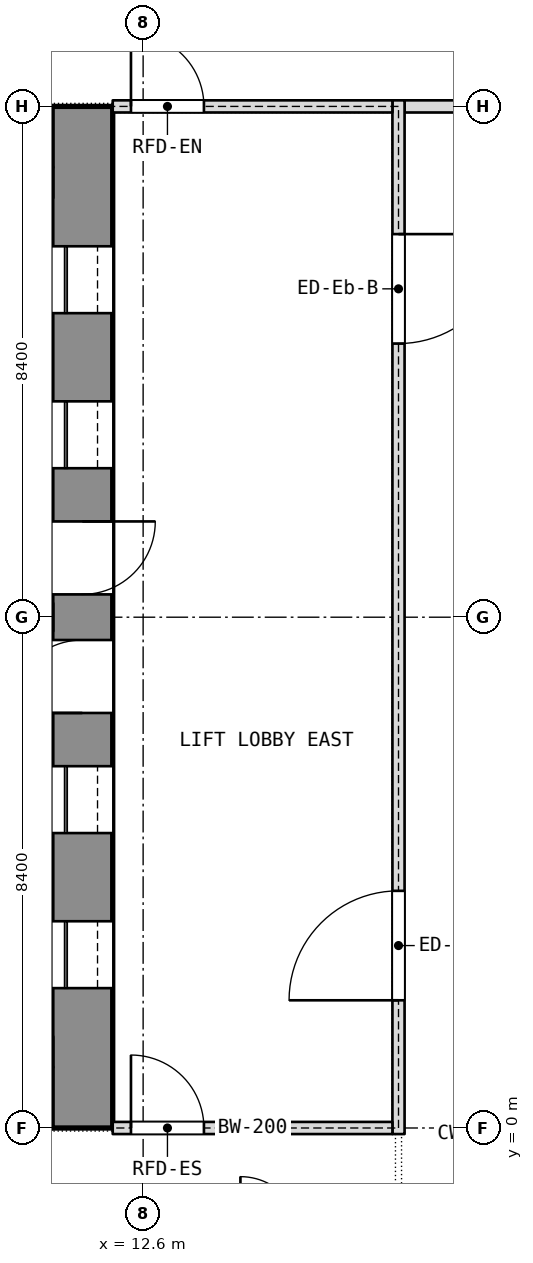
"""IFC4 building model, lengths in metres.
Left out: names, types, materials, properties, quantities, classifications, styles, units other than length and angle.
Written with IfcOpenShell. Run it as: python <this file> out.ifc"""

import sys

from ifc_helpers import new_model, si_unit, direction, frame, frame_2d, origin, place, context, subcontext, project, spatial, rectangle, extrude, element, fill, save


model = new_model("IFC4")
c1 = context("Model", 3, precision=1e-05, world=origin(), true_north=direction((0.0, 1.0)))
c2 = subcontext(c1, "Body", "Model", "MODEL_VIEW")
j1 = project(units=[si_unit("LENGTHUNIT", "METRE"), si_unit("PLANEANGLEUNIT", "RADIAN")], contexts=[c1])
p1 = place(None, origin())
s1 = spatial("IfcSite", under=j1, at=p1, CompositionType="ELEMENT")
p2 = place(p1, origin())
s2 = spatial("IfcBuilding", under=s1, at=p2, CompositionType="ELEMENT")
p3 = place(p2, frame((0.0, 0.0, 133.7)))
s3 = spatial("IfcBuildingStorey", under=s2, at=p3, CompositionType="ELEMENT", Elevation=133.7)
p4 = place(p3, frame((11.6, 0.0, 0.0), z_axis=(0.0, 0.0, 1.0), x_axis=(0.0, 1.0, 0.0)))
e1 = element("IfcWall", 1, at=p4, inside=s3, PredefinedType="SHEAR", context=c2, shape_type="SweptSolid", body=[
    extrude(rectangle(XDim=16.8, YDim=1.0, at=frame_2d((8.4, 0.0))), origin(), (0.0, 0.0, 1.0), 3.6),
])
p5 = place(p4, frame((2.3, 0.0, 0.0)))
e2 = element("IfcOpeningElement", 2, at=p5, cuts=e1, PredefinedType="OPENING", context=c2, shape_type="SweptSolid", body=[
    extrude(rectangle(XDim=1.1, YDim=2.1, at=frame_2d((0.55, 1.05))), frame((0.0, 0.5, 0.0), z_axis=(0.0, -1.0, 0.0), x_axis=(1.0, 0.0, 0.0)), (0.0, 0.0, 1.0), 1.0),
])
p6 = place(p4, frame((4.85, 0.0, 0.0)))
e3 = element("IfcOpeningElement", 3, at=p6, cuts=e1, PredefinedType="OPENING", context=c2, shape_type="SweptSolid", body=[
    extrude(rectangle(XDim=1.1, YDim=2.1, at=frame_2d((0.55, 1.05))), frame((0.0, 0.5, 0.0), z_axis=(0.0, -1.0, 0.0), x_axis=(1.0, 0.0, 0.0)), (0.0, 0.0, 1.0), 1.0),
])
p7 = place(p4, frame((6.825, 0.0, 0.0)))
e4 = element("IfcOpeningElement", 4, at=p7, cuts=e1, PredefinedType="OPENING", context=c2, shape_type="SweptSolid", body=[
    extrude(rectangle(XDim=1.2, YDim=2.1, at=frame_2d((0.6, 1.05))), frame((0.0, 0.5, 0.0), z_axis=(0.0, -1.0, 0.0), x_axis=(1.0, 0.0, 0.0)), (0.0, 0.0, 1.0), 1.0),
])
p8 = place(p4, frame((13.4, 0.0, 0.0)))
e5 = element("IfcOpeningElement", 5, at=p8, cuts=e1, PredefinedType="OPENING", context=c2, shape_type="SweptSolid", body=[
    extrude(rectangle(XDim=1.1, YDim=2.1, at=frame_2d((0.55, 1.05))), frame((0.0, 0.5, 0.0), z_axis=(0.0, -1.0, 0.0), x_axis=(1.0, 0.0, 0.0)), (0.0, 0.0, 1.0), 1.0),
])
p9 = place(p4, frame((10.85, 0.0, 0.0)))
e6 = element("IfcOpeningElement", 6, at=p9, cuts=e1, PredefinedType="OPENING", context=c2, shape_type="SweptSolid", body=[
    extrude(rectangle(XDim=1.1, YDim=2.1, at=frame_2d((0.55, 1.05))), frame((0.0, 0.5, 0.0), z_axis=(0.0, -1.0, 0.0), x_axis=(1.0, 0.0, 0.0)), (0.0, 0.0, 1.0), 1.0),
])
p10 = place(p4, frame((8.775, 0.0, 0.0)))
e7 = element("IfcOpeningElement", 7, at=p10, cuts=e1, PredefinedType="OPENING", context=c2, shape_type="SweptSolid", body=[
    extrude(rectangle(XDim=1.2, YDim=2.1, at=frame_2d((0.6, 1.05))), frame((0.0, 0.5, 0.0), z_axis=(0.0, -1.0, 0.0), x_axis=(1.0, 0.0, 0.0)), (0.0, 0.0, 1.0), 1.0),
])
p11 = place(p3, frame((16.9, 16.8, 0.0), z_axis=(0.0, 0.0, 1.0), x_axis=(1.0, 0.0, 0.0)))
e8 = element("IfcWall", 8, at=p11, inside=s3, PredefinedType="PARTITIONING", context=c2, shape_type="SweptSolid", body=[
    extrude(rectangle(XDim=1.5, YDim=0.2, at=frame_2d((0.75, 0.0))), origin(), (0.0, 0.0, 1.0), 2.89),
])
p12 = place(p3, frame((16.8, -0.1, 0.0), z_axis=(0.0, 0.0, 1.0), x_axis=(0.0, 1.0, 0.0)))
e9 = element("IfcWall", 9, at=p12, inside=s3, PredefinedType="PARTITIONING", context=c2, shape_type="SweptSolid", body=[
    extrude(rectangle(XDim=17.0, YDim=0.2, at=frame_2d((8.5, 0.0))), origin(), (0.0, 0.0, 1.0), 3.34),
])
p13 = place(p12, frame((2.2, 0.0, 0.0)))
e10 = element("IfcOpeningElement", 10, at=p13, cuts=e9, PredefinedType="OPENING", context=c2, shape_type="SweptSolid", body=[
    extrude(rectangle(XDim=1.8, YDim=2.1, at=frame_2d((0.9, 1.05))), frame((0.0, 0.1, 0.0), z_axis=(0.0, -1.0, 0.0), x_axis=(1.0, 0.0, 0.0)), (0.0, 0.0, 1.0), 0.2),
])
p14 = place(p12, frame((13.0, 0.0, 0.0)))
e11 = element("IfcOpeningElement", 11, at=p14, cuts=e9, PredefinedType="OPENING", context=c2, shape_type="SweptSolid", body=[
    extrude(rectangle(XDim=1.8, YDim=2.1, at=frame_2d((0.9, 1.05))), frame((0.0, 0.1, 0.0), z_axis=(0.0, -1.0, 0.0), x_axis=(1.0, 0.0, 0.0)), (0.0, 0.0, 1.0), 0.2),
])
p15 = place(p3, frame((12.1, 0.0, 0.0), z_axis=(0.0, 0.0, 1.0), x_axis=(1.0, 0.0, 0.0)))
e12 = element("IfcWall", 12, at=p15, inside=s3, PredefinedType="PARTITIONING", context=c2, shape_type="SweptSolid", body=[
    extrude(rectangle(XDim=4.6, YDim=0.2, at=frame_2d((2.3, 0.0))), origin(), (0.0, 0.0, 1.0), 2.89),
])
p16 = place(p15, frame((0.3, 0.0, 0.0)))
e13 = element("IfcOpeningElement", 13, at=p16, cuts=e12, PredefinedType="OPENING", context=c2, shape_type="SweptSolid", body=[
    extrude(rectangle(XDim=1.2, YDim=2.1, at=frame_2d((0.6, 1.05))), frame((0.0, 0.1, 0.0), z_axis=(0.0, -1.0, 0.0), x_axis=(1.0, 0.0, 0.0)), (0.0, 0.0, 1.0), 0.2),
])
p17 = place(p3, frame((12.1, 16.8, 0.0), z_axis=(0.0, 0.0, 1.0), x_axis=(1.0, 0.0, 0.0)))
e14 = element("IfcWall", 14, at=p17, inside=s3, PredefinedType="PARTITIONING", context=c2, shape_type="SweptSolid", body=[
    extrude(rectangle(XDim=4.6, YDim=0.2, at=frame_2d((2.3, 0.0))), origin(), (0.0, 0.0, 1.0), 2.89),
])
p18 = place(p17, frame((0.3, 0.0, 0.0)))
e15 = element("IfcOpeningElement", 15, at=p18, cuts=e14, PredefinedType="OPENING", context=c2, shape_type="SweptSolid", body=[
    extrude(rectangle(XDim=1.2, YDim=2.1, at=frame_2d((0.6, 1.05))), frame((0.0, 0.1, 0.0), z_axis=(0.0, -1.0, 0.0), x_axis=(1.0, 0.0, 0.0)), (0.0, 0.0, 1.0), 0.2),
])
p19 = place(p5, origin())
e16 = element("IfcDoor", 16, at=p19, inside=s3, OperationType="SLIDING_TO_LEFT", PredefinedType="DOOR", context=c2, shape_type="SweptSolid", body=[
    extrude(rectangle(XDim=1.1, YDim=2.1, at=frame_2d((0.55, 1.05))), frame((0.0, 0.025, 0.0), z_axis=(0.0, -1.0, 0.0), x_axis=(1.0, 0.0, 0.0)), (0.0, 0.0, 1.0), 0.05),
])
fill(e2, e16)
p20 = place(p6, origin())
e17 = element("IfcDoor", 17, at=p20, inside=s3, OperationType="SLIDING_TO_LEFT", PredefinedType="DOOR", context=c2, shape_type="SweptSolid", body=[
    extrude(rectangle(XDim=1.1, YDim=2.1, at=frame_2d((0.55, 1.05))), frame((0.0, 0.025, 0.0), z_axis=(0.0, -1.0, 0.0), x_axis=(1.0, 0.0, 0.0)), (0.0, 0.0, 1.0), 0.05),
])
fill(e3, e17)
p21 = place(p7, origin())
e18 = element("IfcDoor", 18, at=p21, inside=s3, OperationType="SINGLE_SWING_LEFT", PredefinedType="DOOR", context=c2, shape_type="SweptSolid", body=[
    extrude(rectangle(XDim=1.2, YDim=2.1, at=frame_2d((0.6, 1.05))), frame((0.0, 0.025, 0.0), z_axis=(0.0, -1.0, 0.0), x_axis=(1.0, 0.0, 0.0)), (0.0, 0.0, 1.0), 0.05),
])
fill(e4, e18)
p22 = place(p8, origin())
e19 = element("IfcDoor", 19, at=p22, inside=s3, OperationType="SLIDING_TO_LEFT", PredefinedType="DOOR", context=c2, shape_type="SweptSolid", body=[
    extrude(rectangle(XDim=1.1, YDim=2.1, at=frame_2d((0.55, 1.05))), frame((0.0, 0.025, 0.0), z_axis=(0.0, -1.0, 0.0), x_axis=(1.0, 0.0, 0.0)), (0.0, 0.0, 1.0), 0.05),
])
fill(e5, e19)
p23 = place(p9, origin())
e20 = element("IfcDoor", 20, at=p23, inside=s3, OperationType="SLIDING_TO_LEFT", PredefinedType="DOOR", context=c2, shape_type="SweptSolid", body=[
    extrude(rectangle(XDim=1.1, YDim=2.1, at=frame_2d((0.55, 1.05))), frame((0.0, 0.025, 0.0), z_axis=(0.0, -1.0, 0.0), x_axis=(1.0, 0.0, 0.0)), (0.0, 0.0, 1.0), 0.05),
])
fill(e6, e20)
p24 = place(p10, origin())
e21 = element("IfcDoor", 21, at=p24, inside=s3, OperationType="SINGLE_SWING_LEFT", PredefinedType="DOOR", context=c2, shape_type="SweptSolid", body=[
    extrude(rectangle(XDim=1.2, YDim=2.1, at=frame_2d((0.6, 1.05))), frame((0.0, 0.025, 0.0), z_axis=(0.0, -1.0, 0.0), x_axis=(1.0, 0.0, 0.0)), (0.0, 0.0, 1.0), 0.05),
])
fill(e7, e21)
p25 = place(p13, origin())
e22 = element("IfcDoor", 22, at=p25, inside=s3, OperationType="DOUBLE_DOOR_SINGLE_SWING", PredefinedType="DOOR", context=c2, shape_type="SweptSolid", body=[
    extrude(rectangle(XDim=1.8, YDim=2.1, at=frame_2d((0.9, 1.05))), frame((0.0, 0.025, 0.0), z_axis=(0.0, -1.0, 0.0), x_axis=(1.0, 0.0, 0.0)), (0.0, 0.0, 1.0), 0.05),
])
fill(e10, e22)
p26 = place(p14, origin())
e23 = element("IfcDoor", 23, at=p26, inside=s3, OperationType="DOUBLE_DOOR_SINGLE_SWING", PredefinedType="DOOR", context=c2, shape_type="SweptSolid", body=[
    extrude(rectangle(XDim=1.8, YDim=2.1, at=frame_2d((0.9, 1.05))), frame((0.0, 0.025, 0.0), z_axis=(0.0, -1.0, 0.0), x_axis=(1.0, 0.0, 0.0)), (0.0, 0.0, 1.0), 0.05),
])
fill(e11, e23)
p27 = place(p16, origin())
e24 = element("IfcDoor", 24, at=p27, inside=s3, OperationType="SINGLE_SWING_LEFT", PredefinedType="DOOR", context=c2, shape_type="SweptSolid", body=[
    extrude(rectangle(XDim=1.2, YDim=2.1, at=frame_2d((0.6, 1.05))), frame((0.0, 0.025, 0.0), z_axis=(0.0, -1.0, 0.0), x_axis=(1.0, 0.0, 0.0)), (0.0, 0.0, 1.0), 0.05),
])
fill(e13, e24)
p28 = place(p18, origin())
e25 = element("IfcDoor", 25, at=p28, inside=s3, OperationType="SINGLE_SWING_LEFT", PredefinedType="DOOR", context=c2, shape_type="SweptSolid", body=[
    extrude(rectangle(XDim=1.2, YDim=2.1, at=frame_2d((0.6, 1.05))), frame((0.0, 0.025, 0.0), z_axis=(0.0, -1.0, 0.0), x_axis=(1.0, 0.0, 0.0)), (0.0, 0.0, 1.0), 0.05),
])
fill(e15, e25)
save(model, sys.argv[1])
